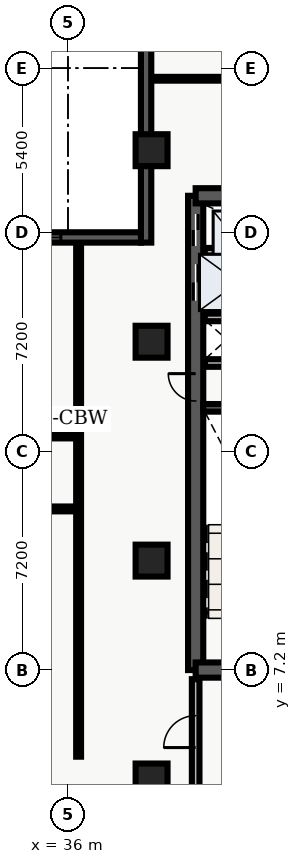
"""IFC4 building model, lengths in metres.
Left out: names, types, materials, properties, quantities, classifications, styles, units other than length and angle.
Written with IfcOpenShell. Run it as: python <this file> out.ifc"""

import sys

from ifc_helpers import new_model, entity, si_unit, converted_unit, direction, frame, origin_with_axes, origin_2d_with_axis, place, context, subcontext, project, spatial, polyline, rectangle, outline, extrude, element, fill, save


model = new_model("IFC4")
c1 = context("Model", 3, precision=1e-05, world=origin_with_axes(), true_north=direction((0.0, 1.0)))
c2 = subcontext(c1, "Body", "Model", "MODEL_VIEW")
j1 = project(units=[si_unit("LENGTHUNIT", "METRE"), converted_unit("PLANEANGLEUNIT", "DEGREE", entity("IfcPlaneAngleMeasure", 0.017), si_unit("PLANEANGLEUNIT", "RADIAN"), dimensions=[0, 0, 0, 0, 0, 0, 0])], contexts=[c1])
p1 = place(None, origin_with_axes())
s1 = spatial("IfcSite", under=j1, at=p1, CompositionType="ELEMENT")
p2 = place(p1, origin_with_axes())
s2 = spatial("IfcBuilding", under=s1, at=p2, CompositionType="ELEMENT")
p3 = place(p2, frame((0.0, 0.0, 179.7), z_axis=(0.0, 0.0, 1.0), x_axis=(1.0, 0.0, 0.0)))
s3 = spatial("IfcBuildingStorey", under=s2, at=p3, CompositionType="ELEMENT", Elevation=179.7)
p4 = place(p3, frame((40.2, 7.2, 0.0), z_axis=(0.0, 0.0, 1.0), x_axis=(0.0, 1.0, 0.0)))
e1 = element("IfcWall", 1, at=p4, inside=s3, PredefinedType="SHEAR", context=c2, shape_type="SweptSolid", body=[
    extrude(outline(polyline([(0.0, -0.25), (15.6, -0.25), (15.6, 0.25), (0.0, 0.25), (0.0, -0.25)])), origin_with_axes(), (0.0, 0.0, 1.0), 3.66),
])
p5 = place(p4, frame((14.475, 0.0, 0.0), z_axis=(0.0, 0.0, 1.0), x_axis=(1.0, 0.0, 0.0)))
e2 = element("IfcOpeningElement", 2, at=p5, cuts=e1, PredefinedType="OPENING", context=c2, shape_type="SweptSolid", body=[
    extrude(rectangle(XDim=1.05, YDim=0.52, at=origin_2d_with_axis()), origin_with_axes(), (0.0, 0.0, 1.0), 2.15),
])
p6 = place(p4, frame((12.75, 0.0, 0.0), z_axis=(0.0, 0.0, 1.0), x_axis=(1.0, 0.0, 0.0)))
e3 = element("IfcOpeningElement", 3, at=p6, cuts=e1, PredefinedType="OPENING", context=c2, shape_type="SweptSolid", body=[
    extrude(rectangle(XDim=1.2, YDim=0.52, at=origin_2d_with_axis()), origin_with_axes(), (0.0, 0.0, 1.0), 2.15),
])
p7 = place(p4, frame((9.3, 0.0, 0.0), z_axis=(0.0, 0.0, 1.0), x_axis=(1.0, 0.0, 0.0)))
e4 = element("IfcOpeningElement", 4, at=p7, cuts=e1, PredefinedType="OPENING", context=c2, shape_type="SweptSolid", body=[
    extrude(rectangle(XDim=0.9, YDim=0.52, at=origin_2d_with_axis()), origin_with_axes(), (0.0, 0.0, 1.0), 2.15),
])
p8 = place(p3, frame((40.2, 7.2, 0.0), z_axis=(0.0, 0.0, 1.0), x_axis=(1.0, 0.0, 0.0)))
e5 = element("IfcWall", 5, at=p8, inside=s3, PredefinedType="SHEAR", context=c2, shape_type="SweptSolid", body=[
    extrude(outline(polyline([(0.0, -0.25), (7.85, -0.25), (7.85, 0.25), (0.0, 0.25), (0.0, -0.25)])), origin_with_axes(), (0.0, 0.0, 1.0), 3.66),
])
p9 = place(p8, frame((2.175, 0.0, 0.0), z_axis=(0.0, 0.0, 1.0), x_axis=(1.0, 0.0, 0.0)))
e6 = element("IfcOpeningElement", 6, at=p9, cuts=e5, PredefinedType="OPENING", context=c2, shape_type="SweptSolid", body=[
    extrude(rectangle(XDim=1.05, YDim=0.52, at=origin_2d_with_axis()), origin_with_axes(), (0.0, 0.0, 1.0), 2.15),
])
p10 = place(p3, frame((40.2, 22.8, 0.0), z_axis=(0.0, 0.0, 1.0), x_axis=(1.0, 0.0, 0.0)))
e7 = element("IfcWall", 7, at=p10, inside=s3, PredefinedType="SHEAR", context=c2, shape_type="SweptSolid", body=[
    extrude(outline(polyline([(0.0, -0.25), (7.85, -0.25), (7.85, 0.25), (0.0, 0.25), (0.0, -0.25)])), origin_with_axes(), (0.0, 0.0, 1.0), 3.66),
])
p11 = place(p10, frame((5.775, 0.0, 0.0), z_axis=(0.0, 0.0, 1.0), x_axis=(1.0, 0.0, 0.0)))
e8 = element("IfcOpeningElement", 8, at=p11, cuts=e7, PredefinedType="OPENING", context=c2, shape_type="SweptSolid", body=[
    extrude(rectangle(XDim=1.05, YDim=0.52, at=origin_2d_with_axis()), origin_with_axes(), (0.0, 0.0, 1.0), 2.15),
])
p12 = place(p3, frame((40.45, 15.825, 0.0), z_axis=(0.0, 0.0, 1.0), x_axis=(1.0, 0.0, 0.0)))
e9 = element("IfcWall", 9, at=p12, inside=s3, PredefinedType="SHEAR", context=c2, shape_type="SweptSolid", body=[
    extrude(outline(polyline([(0.0, -0.125), (3.55, -0.125), (3.55, 0.125), (0.0, 0.125), (0.0, -0.125)])), origin_with_axes(), (0.0, 0.0, 1.0), 3.66),
])
p13 = place(p3, frame((40.5, 17.3, 0.0), z_axis=(0.0, 0.0, 1.0), x_axis=(1.0, 0.0, 0.0)))
e10 = element("IfcWall", 10, at=p13, inside=s3, PredefinedType="SOLIDWALL", context=c2, shape_type="SweptSolid", body=[
    extrude(outline(polyline([(0.0, -0.125), (3.5, -0.125), (3.5, 0.125), (0.0, 0.125), (0.0, -0.125)])), origin_with_axes(), (0.0, 0.0, 1.0), 2.7),
])
p14 = place(p13, frame((2.4, 0.0, 0.0), z_axis=(0.0, 0.0, 1.0), x_axis=(1.0, 0.0, 0.0)))
e11 = element("IfcOpeningElement", 11, at=p14, cuts=e10, PredefinedType="OPENING", context=c2, shape_type="SweptSolid", body=[
    extrude(rectangle(XDim=0.9, YDim=0.27, at=origin_2d_with_axis()), origin_with_axes(), (0.0, 0.0, 1.0), 2.15),
])
p15 = place(p3, frame((40.5, 18.8, 0.0), z_axis=(0.0, 0.0, 1.0), x_axis=(1.0, 0.0, 0.0)))
e12 = element("IfcWall", 12, at=p15, inside=s3, PredefinedType="SOLIDWALL", context=c2, shape_type="SweptSolid", body=[
    extrude(outline(polyline([(0.0, -0.125), (3.5, -0.125), (3.5, 0.125), (0.0, 0.125), (0.0, -0.125)])), origin_with_axes(), (0.0, 0.0, 1.0), 2.7),
])
p16 = place(p3, frame((40.2, 3.1, 0.0), z_axis=(0.0, 0.0, 1.0), x_axis=(0.0, 1.0, 0.0)))
e13 = element("IfcWall", 13, at=p16, inside=s3, PredefinedType="SOLIDWALL", context=c2, shape_type="SweptSolid", body=[
    extrude(outline(polyline([(0.0, -0.125), (3.8, -0.125), (3.8, 0.125), (0.0, 0.125), (0.0, -0.125)])), origin_with_axes(), (0.0, 0.0, 1.0), 2.7),
])
p17 = place(p16, frame((2.075, 0.0, 0.0), z_axis=(0.0, 0.0, 1.0), x_axis=(1.0, 0.0, 0.0)))
e14 = element("IfcOpeningElement", 14, at=p17, cuts=e13, PredefinedType="OPENING", context=c2, shape_type="SweptSolid", body=[
    extrude(rectangle(XDim=1.05, YDim=0.27, at=origin_2d_with_axis()), origin_with_axes(), (0.0, 0.0, 1.0), 2.15),
])
for number, where, z_axis, x_axis in (
    (15, (38.75, 3.6, 0.0), (0.0, 0.0, 1.0), (1.0, 0.0, 0.0)),
    (16, (38.75, 10.8, 0.0), (0.0, 0.0, 1.0), (1.0, 0.0, 0.0)),
    (17, (38.75, 18.0, 0.0), (0.0, 0.0, 1.0), (1.0, 0.0, 0.0)),
    (18, (38.75, 24.3, 0.0), (0.0, 0.0, 1.0), (1.0, 0.0, 0.0)),
):
    element("IfcColumn", number, at=place(p3, frame(where, z_axis=z_axis, x_axis=x_axis)), inside=s3, PredefinedType="COLUMN", context=c2, shape_type="SweptSolid", body=[
        extrude(rectangle(XDim=1.05, YDim=1.05, at=origin_2d_with_axis()), origin_with_axes(), (0.0, 0.0, 1.0), 3.9),
    ])
p18 = place(p3, frame((40.5, 20.96, 0.0), z_axis=(0.0, 0.0, 1.0), x_axis=(1.0, 0.0, 0.0)))
e19 = element("IfcWall", 19, at=p18, inside=s3, PredefinedType="SOLIDWALL", context=c2, shape_type="SweptSolid", body=[
    extrude(outline(polyline([(0.0, -0.125), (3.5, -0.125), (3.5, 0.125), (0.0, 0.125), (0.0, -0.125)])), origin_with_axes(), (0.0, 0.0, 1.0), 2.7),
])
p19 = place(p3, frame((21.15, 12.5, 0.0), z_axis=(0.0, 0.0, 1.0), x_axis=(1.0, 0.0, 0.0)))
e20 = element("IfcWall", 20, at=p19, inside=s3, PredefinedType="PARTITIONING", context=c2, shape_type="SweptSolid", body=[
    extrude(outline(polyline([(0.0, -0.08), (15.2, -0.08), (15.2, 0.08), (0.0, 0.08), (0.0, -0.08)])), origin_with_axes(), (0.0, 0.0, 1.0), 2.7),
])
p20 = place(p19, frame((1.761, 0.0, 0.0), z_axis=(0.0, 0.0, 1.0), x_axis=(1.0, 0.0, 0.0)))
e21 = element("IfcOpeningElement", 21, at=p20, cuts=e20, PredefinedType="OPENING", context=c2, shape_type="SweptSolid", body=[
    extrude(rectangle(XDim=1.0, YDim=0.18, at=origin_2d_with_axis()), origin_with_axes(), (0.0, 0.0, 1.0), 2.15),
])
p21 = place(p19, frame((4.896, 0.0, 0.0), z_axis=(0.0, 0.0, 1.0), x_axis=(1.0, 0.0, 0.0)))
e22 = element("IfcOpeningElement", 22, at=p21, cuts=e20, PredefinedType="OPENING", context=c2, shape_type="SweptSolid", body=[
    extrude(rectangle(XDim=1.0, YDim=0.18, at=origin_2d_with_axis()), origin_with_axes(), (0.0, 0.0, 1.0), 2.15),
])
p22 = place(p19, frame((8.536, 0.0, 0.0), z_axis=(0.0, 0.0, 1.0), x_axis=(1.0, 0.0, 0.0)))
e23 = element("IfcOpeningElement", 23, at=p22, cuts=e20, PredefinedType="OPENING", context=c2, shape_type="SweptSolid", body=[
    extrude(rectangle(XDim=1.0, YDim=0.18, at=origin_2d_with_axis()), origin_with_axes(), (0.0, 0.0, 1.0), 2.15),
])
p23 = place(p19, frame((12.871, 0.0, 0.0), z_axis=(0.0, 0.0, 1.0), x_axis=(1.0, 0.0, 0.0)))
e24 = element("IfcOpeningElement", 24, at=p23, cuts=e20, PredefinedType="OPENING", context=c2, shape_type="SweptSolid", body=[
    extrude(rectangle(XDim=1.0, YDim=0.18, at=origin_2d_with_axis()), origin_with_axes(), (0.0, 0.0, 1.0), 2.15),
])
p24 = place(p3, frame((21.15, 14.9, 0.0), z_axis=(0.0, 0.0, 1.0), x_axis=(1.0, 0.0, 0.0)))
e25 = element("IfcWall", 25, at=p24, inside=s3, PredefinedType="PARTITIONING", context=c2, shape_type="SweptSolid", body=[
    extrude(outline(polyline([(0.0, -0.08), (15.2, -0.08), (15.2, 0.08), (0.0, 0.08), (0.0, -0.08)])), origin_with_axes(), (0.0, 0.0, 1.0), 2.7),
])
p25 = place(p24, frame((7.65, 0.0, 0.0), z_axis=(0.0, 0.0, 1.0), x_axis=(1.0, 0.0, 0.0)))
e26 = element("IfcOpeningElement", 26, at=p25, cuts=e25, PredefinedType="OPENING", context=c2, shape_type="SweptSolid", body=[
    extrude(rectangle(XDim=1.0, YDim=0.18, at=origin_2d_with_axis()), origin_with_axes(), (0.0, 0.0, 1.0), 2.15),
])
p26 = place(p3, frame((36.35, 4.35, 0.0), z_axis=(0.0, 0.0, 1.0), x_axis=(0.0, 1.0, 0.0)))
e27 = element("IfcWall", 27, at=p26, inside=s3, PredefinedType="PARTITIONING", context=c2, shape_type="SweptSolid", body=[
    extrude(outline(polyline([(0.0, -0.08), (16.95, -0.08), (16.95, 0.08), (0.0, 0.08), (0.0, -0.08)])), origin_with_axes(), (0.0, 0.0, 1.0), 2.7),
])
p27 = place(p3, frame((38.735, 26.65, 0.0), z_axis=(0.0, 0.0, 1.0), x_axis=(1.0, 0.0, 0.0)))
e28 = element("IfcWall", 28, at=p27, inside=s3, PredefinedType="PARTITIONING", context=c2, shape_type="SweptSolid", body=[
    extrude(outline(polyline([(0.0, -0.062), (20.905, -0.062), (20.905, 0.062), (0.0, 0.062), (0.0, -0.062)])), origin_with_axes(), (0.0, 0.0, 1.0), 2.7),
])
p28 = place(p27, frame((4.265, 0.0, 0.0), z_axis=(0.0, 0.0, 1.0), x_axis=(1.0, 0.0, 0.0)))
e29 = element("IfcOpeningElement", 29, at=p28, cuts=e28, PredefinedType="OPENING", context=c2, shape_type="SweptSolid", body=[
    extrude(rectangle(XDim=1.0, YDim=0.145, at=origin_2d_with_axis()), origin_with_axes(), (0.0, 0.0, 1.0), 2.15),
])
p29 = place(p3, frame((38.57, 21.26, 0.0), z_axis=(0.0, 0.0, 1.0), x_axis=(0.0, 1.0, 0.0)))
e30 = element("IfcWall", 30, at=p29, inside=s3, PredefinedType="SOLIDWALL", context=c2, shape_type="SweptSolid", body=[
    extrude(outline(polyline([(0.0, -0.17), (7.54, -0.17), (7.54, 0.17), (0.0, 0.17), (0.0, -0.17)])), origin_with_axes(), (0.0, 0.0, 1.0), 3.66),
])
p30 = place(p3, frame((25.465, 21.43, 0.0), z_axis=(0.0, 0.0, 1.0), x_axis=(1.0, 0.0, 0.0)))
e31 = element("IfcWall", 31, at=p30, inside=s3, PredefinedType="SOLIDWALL", context=c2, shape_type="SweptSolid", body=[
    extrude(outline(polyline([(0.0, -0.17), (12.935, -0.17), (12.935, 0.17), (0.0, 0.17), (0.0, -0.17)])), origin_with_axes(), (0.0, 0.0, 1.0), 3.66),
])
p31 = place(p30, frame((3.534, 0.0, 0.45), z_axis=(0.0, 0.0, 1.0), x_axis=(1.0, 0.0, 0.0)))
e32 = element("IfcOpeningElement", 32, at=p31, cuts=e31, PredefinedType="OPENING", context=c2, shape_type="SweptSolid", body=[
    extrude(rectangle(XDim=1.8, YDim=0.36, at=origin_2d_with_axis()), origin_with_axes(), (0.0, 0.0, 1.0), 2.1),
])
p32 = place(p30, frame((9.401, 0.0, 0.45), z_axis=(0.0, 0.0, 1.0), x_axis=(1.0, 0.0, 0.0)))
e33 = element("IfcOpeningElement", 33, at=p32, cuts=e31, PredefinedType="OPENING", context=c2, shape_type="SweptSolid", body=[
    extrude(rectangle(XDim=1.8, YDim=0.36, at=origin_2d_with_axis()), origin_with_axes(), (0.0, 0.0, 1.0), 2.1),
])
p33 = place(p4, frame((14.475, 0.0, 0.0), z_axis=(0.0, 0.0, 1.0), x_axis=(1.0, 0.0, 0.0)))
e34 = element("IfcDoor", 34, at=p33, inside=s3, OperationType="SLIDING_TO_RIGHT", PredefinedType="DOOR", context=c2, shape_type="SweptSolid", body=[
    extrude(rectangle(XDim=1.05, YDim=0.09, at=origin_2d_with_axis()), origin_with_axes(), (0.0, 0.0, 1.0), 2.15),
])
fill(e2, e34)
p34 = place(p4, frame((12.75, 0.0, 0.0), z_axis=(0.0, 0.0, 1.0), x_axis=(1.0, 0.0, 0.0)))
e35 = element("IfcDoor", 35, at=p34, inside=s3, OperationType="DOUBLE_DOOR_SLIDING", PredefinedType="DOOR", context=c2, shape_type="SweptSolid", body=[
    extrude(rectangle(XDim=1.2, YDim=0.09, at=origin_2d_with_axis()), origin_with_axes(), (0.0, 0.0, 1.0), 2.15),
])
fill(e3, e35)
p35 = place(p4, frame((9.3, 0.0, 0.0), z_axis=(0.0, 0.0, 1.0), x_axis=(1.0, 0.0, 0.0)))
e36 = element("IfcDoor", 36, at=p35, inside=s3, OperationType="SINGLE_SWING_RIGHT", PredefinedType="DOOR", context=c2, shape_type="SweptSolid", body=[
    extrude(rectangle(XDim=0.9, YDim=0.09, at=origin_2d_with_axis()), origin_with_axes(), (0.0, 0.0, 1.0), 2.15),
])
fill(e4, e36)
p36 = place(p16, frame((2.075, 0.0, 0.0), z_axis=(0.0, 0.0, 1.0), x_axis=(1.0, 0.0, 0.0)))
e37 = element("IfcDoor", 37, at=p36, inside=s3, OperationType="SINGLE_SWING_LEFT", PredefinedType="DOOR", context=c2, shape_type="SweptSolid", body=[
    extrude(rectangle(XDim=1.05, YDim=0.09, at=origin_2d_with_axis()), origin_with_axes(), (0.0, 0.0, 1.0), 2.15),
])
fill(e14, e37)
p37 = place(p30, frame((9.401, 0.0, 0.45), z_axis=(0.0, 0.0, 1.0), x_axis=(1.0, 0.0, 0.0)))
e38 = element("IfcWindow", 38, at=p37, inside=s3, PredefinedType="WINDOW", context=c2, shape_type="SweptSolid", body=[
    extrude(rectangle(XDim=1.8, YDim=0.09, at=origin_2d_with_axis()), origin_with_axes(), (0.0, 0.0, 1.0), 2.1),
])
fill(e33, e38)
save(model, sys.argv[1])
